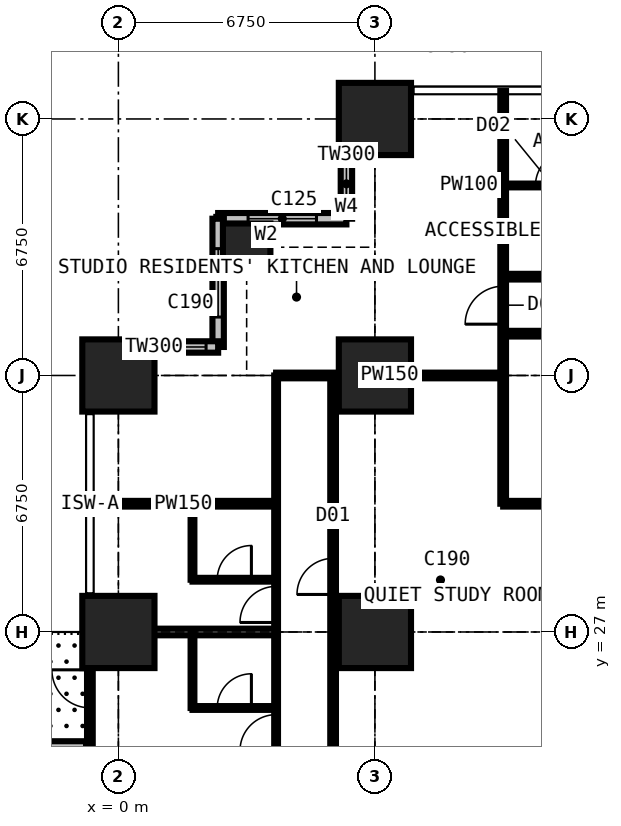
"""IFC4 building model, lengths in metres.
Left out: names, types, materials, properties, quantities, classifications, styles, units other than length and angle.
Written with IfcOpenShell. Run it as: python <this file> out.ifc"""

import sys

from ifc_helpers import new_model, si_unit, direction, frame, frame_2d, origin, origin_2d, place, context, subcontext, project, spatial, rectangle, extrude, element, fill, save


model = new_model("IFC4")
c1 = context("Model", 3, precision=1e-05, world=origin(), true_north=direction((0.0, 1.0)))
c2 = subcontext(c1, "Body", "Model", "MODEL_VIEW")
j1 = project(units=[si_unit("LENGTHUNIT", "METRE"), si_unit("PLANEANGLEUNIT", "RADIAN")], contexts=[c1])
p1 = place(None, origin())
s1 = spatial("IfcSite", under=j1, at=p1, CompositionType="ELEMENT")
p2 = place(p1, origin())
s2 = spatial("IfcBuilding", under=s1, at=p2, CompositionType="ELEMENT")
p3 = place(p2, frame((0.0, 0.0, 36.0)))
s3 = spatial("IfcBuildingStorey", under=s2, at=p3, CompositionType="ELEMENT", Elevation=36.0)
for number, where, z_axis, x_axis in (
    (1, (0.0, 27.0, 0.0), (0.0, 0.0, 1.0), (1.0, 0.0, 0.0)),
    (2, (0.0, 33.75, 0.0), (0.0, 0.0, 1.0), (1.0, 0.0, 0.0)),
):
    element("IfcColumn", number, at=place(p3, frame(where, z_axis=z_axis, x_axis=x_axis)), inside=s3, PredefinedType="COLUMN", context=c2, shape_type="SweptSolid", body=[
        extrude(rectangle(XDim=1.9, YDim=1.9, at=origin_2d()), origin(), (0.0, 0.0, 1.0), 3.6),
    ])
p4 = place(p3, frame((3.375, 37.125, 0.0), z_axis=(0.0, 0.0, 1.0), x_axis=(1.0, 0.0, 0.0)))
e3 = element("IfcColumn", 3, at=p4, inside=s3, PredefinedType="COLUMN", context=c2, shape_type="SweptSolid", body=[
    extrude(rectangle(XDim=1.25, YDim=1.25, at=origin_2d()), origin(), (0.0, 0.0, 1.0), 3.6),
])
for number, where, z_axis, x_axis in (
    (4, (6.75, 27.0, 0.0), (0.0, 0.0, 1.0), (1.0, 0.0, 0.0)),
    (5, (6.75, 33.75, 0.0), (0.0, 0.0, 1.0), (1.0, 0.0, 0.0)),
    (6, (6.75, 40.5, 0.0), (0.0, 0.0, 1.0), (1.0, 0.0, 0.0)),
):
    element("IfcColumn", number, at=place(p3, frame(where, z_axis=z_axis, x_axis=x_axis)), inside=s3, PredefinedType="COLUMN", context=c2, shape_type="SweptSolid", body=[
        extrude(rectangle(XDim=1.9, YDim=1.9, at=origin_2d()), origin(), (0.0, 0.0, 1.0), 3.6),
    ])
p5 = place(p3, frame((6.0, 41.25, 0.0), z_axis=(0.0, 0.0, 1.0), x_axis=(0.0, -1.0, 0.0)))
e7 = element("IfcWall", 7, at=p5, inside=s3, PredefinedType="SOLIDWALL", context=c2, shape_type="SweptSolid", body=[
    extrude(rectangle(XDim=3.375, YDim=0.3, at=frame_2d((1.688, 0.0))), origin(), (0.0, 0.0, 1.0), 3.375),
])
p6 = place(p5, frame((1.857, 0.0, 0.9)))
e8 = element("IfcOpeningElement", 8, at=p6, cuts=e7, PredefinedType="OPENING", context=c2, shape_type="SweptSolid", body=[
    extrude(rectangle(XDim=1.2, YDim=1.8, at=frame_2d((0.6, 0.9))), frame((0.0, 0.16, 0.0), z_axis=(0.0, -1.0, 0.0), x_axis=(1.0, 0.0, 0.0)), (0.0, 0.0, 1.0), 0.32),
])
p7 = place(p3, frame((6.0, 37.875, 0.0), z_axis=(0.0, 0.0, 1.0), x_axis=(-1.0, 0.0, 0.0)))
e9 = element("IfcWall", 9, at=p7, inside=s3, PredefinedType="SOLIDWALL", context=c2, shape_type="SweptSolid", body=[
    extrude(rectangle(XDim=3.375, YDim=0.3, at=frame_2d((1.688, 0.0))), origin(), (0.0, 0.0, 1.0), 3.375),
])
p8 = place(p7, frame((0.788, 0.0, 0.6)))
e10 = element("IfcOpeningElement", 10, at=p8, cuts=e9, PredefinedType="OPENING", context=c2, shape_type="SweptSolid", body=[
    extrude(rectangle(XDim=1.8, YDim=2.1, at=frame_2d((0.9, 1.05))), frame((0.0, 0.16, 0.0), z_axis=(0.0, -1.0, 0.0), x_axis=(1.0, 0.0, 0.0)), (0.0, 0.0, 1.0), 0.32),
])
p9 = place(p3, frame((2.625, 37.875, 0.0), z_axis=(0.0, 0.0, 1.0), x_axis=(0.0, -1.0, 0.0)))
e11 = element("IfcWall", 11, at=p9, inside=s3, PredefinedType="SOLIDWALL", context=c2, shape_type="SweptSolid", body=[
    extrude(rectangle(XDim=3.375, YDim=0.3, at=frame_2d((1.688, 0.0))), origin(), (0.0, 0.0, 1.0), 3.375),
])
p10 = place(p9, frame((0.788, 0.0, 0.6)))
e12 = element("IfcOpeningElement", 12, at=p10, cuts=e11, PredefinedType="OPENING", context=c2, shape_type="SweptSolid", body=[
    extrude(rectangle(XDim=1.8, YDim=2.1, at=frame_2d((0.9, 1.05))), frame((0.0, 0.16, 0.0), z_axis=(0.0, -1.0, 0.0), x_axis=(1.0, 0.0, 0.0)), (0.0, 0.0, 1.0), 0.32),
])
p11 = place(p3, frame((2.625, 34.5, 0.0), z_axis=(0.0, 0.0, 1.0), x_axis=(-1.0, 0.0, 0.0)))
e13 = element("IfcWall", 13, at=p11, inside=s3, PredefinedType="SOLIDWALL", context=c2, shape_type="SweptSolid", body=[
    extrude(rectangle(XDim=3.375, YDim=0.3, at=frame_2d((1.688, 0.0))), origin(), (0.0, 0.0, 1.0), 3.375),
])
p12 = place(p11, frame((0.317, 0.0, 0.9)))
e14 = element("IfcOpeningElement", 14, at=p12, cuts=e13, PredefinedType="OPENING", context=c2, shape_type="SweptSolid", body=[
    extrude(rectangle(XDim=1.2, YDim=1.8, at=frame_2d((0.6, 0.9))), frame((0.0, 0.16, 0.0), z_axis=(0.0, -1.0, 0.0), x_axis=(1.0, 0.0, 0.0)), (0.0, 0.0, 1.0), 0.32),
])
p13 = place(p3, frame((-0.75, 20.25, 0.0), z_axis=(0.0, 0.0, 1.0), x_axis=(0.0, 1.0, 0.0)))
e15 = element("IfcWall", 15, at=p13, inside=s3, PredefinedType="SOLIDWALL", context=c2, shape_type="SweptSolid", body=[
    extrude(rectangle(XDim=6.75, YDim=0.15, at=frame_2d((3.375, 0.0))), origin(), (0.0, 0.0, 1.0), 3.375),
])
p14 = place(p13, frame((0.996, 0.0, 0.0)))
e16 = element("IfcOpeningElement", 16, at=p14, cuts=e15, PredefinedType="OPENING", context=c2, shape_type="SweptSolid", body=[
    extrude(rectangle(XDim=1.0, YDim=2.2, at=frame_2d((0.5, 1.1))), frame((0.0, 0.085, 0.0), z_axis=(0.0, -1.0, 0.0), x_axis=(1.0, 0.0, 0.0)), (0.0, 0.0, 1.0), 0.17),
])
p15 = place(p13, frame((2.042, 0.0, 0.9)))
e17 = element("IfcOpeningElement", 17, at=p15, cuts=e15, PredefinedType="OPENING", context=c2, shape_type="SweptSolid", body=[
    extrude(rectangle(XDim=1.2, YDim=1.8, at=frame_2d((0.6, 0.9))), frame((0.0, 0.085, 0.0), z_axis=(0.0, -1.0, 0.0), x_axis=(1.0, 0.0, 0.0)), (0.0, 0.0, 1.0), 0.17),
])
p16 = place(p13, frame((4.754, 0.0, 0.0)))
e18 = element("IfcOpeningElement", 18, at=p16, cuts=e15, PredefinedType="OPENING", context=c2, shape_type="SweptSolid", body=[
    extrude(rectangle(XDim=1.0, YDim=2.2, at=frame_2d((0.5, 1.1))), frame((0.0, 0.085, 0.0), z_axis=(0.0, -1.0, 0.0), x_axis=(1.0, 0.0, 0.0)), (0.0, 0.0, 1.0), 0.17),
])
p17 = place(p13, frame((3.508, 0.0, 0.9)))
e19 = element("IfcOpeningElement", 19, at=p17, cuts=e15, PredefinedType="OPENING", context=c2, shape_type="SweptSolid", body=[
    extrude(rectangle(XDim=1.2, YDim=1.8, at=frame_2d((0.6, 0.9))), frame((0.0, 0.085, 0.0), z_axis=(0.0, -1.0, 0.0), x_axis=(1.0, 0.0, 0.0)), (0.0, 0.0, 1.0), 0.17),
])
p18 = place(p3, frame((-0.85, 23.625, 0.0), z_axis=(0.0, 0.0, 1.0), x_axis=(-1.0, 0.0, 0.0)))
e20 = element("IfcWall", 20, at=p18, inside=s3, PredefinedType="USERDEFINED", context=c2, shape_type="SweptSolid", body=[
    extrude(rectangle(XDim=2.2, YDim=1.0, at=frame_2d((1.1, 0.0))), origin(), (0.0, 0.0, 1.0), 0.9),
])
p19 = place(p3, frame((-0.734, 27.0, 0.0), z_axis=(0.0, 0.0, 1.0), x_axis=(1.0, 0.0, 0.0)))
e21 = element("IfcWall", 21, at=p19, inside=s3, PredefinedType="PARTITIONING", context=c2, shape_type="SweptSolid", body=[
    extrude(rectangle(XDim=4.884, YDim=0.175, at=frame_2d((2.442, 0.0))), origin(), (0.0, 0.0, 1.0), 2.877),
])
p20 = place(p3, frame((-0.734, 30.375, 0.0), z_axis=(0.0, 0.0, 1.0), x_axis=(1.0, 0.0, 0.0)))
e22 = element("IfcWall", 22, at=p20, inside=s3, PredefinedType="PARTITIONING", context=c2, shape_type="SweptSolid", body=[
    extrude(rectangle(XDim=4.884, YDim=0.15, at=frame_2d((2.442, 0.0))), origin(), (0.0, 0.0, 1.0), 3.375),
])
p21 = place(p3, frame((1.95, 25.0, 0.0), z_axis=(0.0, 0.0, 1.0), x_axis=(0.0, 1.0, 0.0)))
e23 = element("IfcWall", 23, at=p21, inside=s3, PredefinedType="PARTITIONING", context=c2, shape_type="SweptSolid", body=[
    extrude(rectangle(XDim=2.0, YDim=0.1, at=frame_2d((1.0, 0.0))), origin(), (0.0, 0.0, 1.0), 3.375),
])
p22 = place(p3, frame((1.95, 25.0, 0.0), z_axis=(0.0, 0.0, 1.0), x_axis=(1.0, 0.0, 0.0)))
e24 = element("IfcWall", 24, at=p22, inside=s3, PredefinedType="PARTITIONING", context=c2, shape_type="SweptSolid", body=[
    extrude(rectangle(XDim=2.2, YDim=0.1, at=frame_2d((1.1, 0.0))), origin(), (0.0, 0.0, 1.0), 3.375),
])
p23 = place(p22, frame((0.65, 0.0, 0.0)))
e25 = element("IfcOpeningElement", 25, at=p23, cuts=e24, PredefinedType="OPENING", context=c2, shape_type="SweptSolid", body=[
    extrude(rectangle(XDim=0.9, YDim=2.2, at=frame_2d((0.45, 1.1))), frame((0.0, 0.06, 0.0), z_axis=(0.0, -1.0, 0.0), x_axis=(1.0, 0.0, 0.0)), (0.0, 0.0, 1.0), 0.12),
])
p24 = place(p3, frame((1.95, 28.375, 0.0), z_axis=(0.0, 0.0, 1.0), x_axis=(0.0, 1.0, 0.0)))
e26 = element("IfcWall", 26, at=p24, inside=s3, PredefinedType="PARTITIONING", context=c2, shape_type="SweptSolid", body=[
    extrude(rectangle(XDim=2.0, YDim=0.1, at=frame_2d((1.0, 0.0))), origin(), (0.0, 0.0, 1.0), 3.375),
])
p25 = place(p3, frame((1.95, 28.375, 0.0), z_axis=(0.0, 0.0, 1.0), x_axis=(1.0, 0.0, 0.0)))
e27 = element("IfcWall", 27, at=p25, inside=s3, PredefinedType="PARTITIONING", context=c2, shape_type="SweptSolid", body=[
    extrude(rectangle(XDim=2.2, YDim=0.1, at=frame_2d((1.1, 0.0))), origin(), (0.0, 0.0, 1.0), 3.375),
])
p26 = place(p25, frame((0.65, 0.0, 0.0)))
e28 = element("IfcOpeningElement", 28, at=p26, cuts=e27, PredefinedType="OPENING", context=c2, shape_type="SweptSolid", body=[
    extrude(rectangle(XDim=0.9, YDim=2.2, at=frame_2d((0.45, 1.1))), frame((0.0, 0.06, 0.0), z_axis=(0.0, -1.0, 0.0), x_axis=(1.0, 0.0, 0.0)), (0.0, 0.0, 1.0), 0.12),
])
p27 = place(p3, frame((4.15, 10.125, 0.0), z_axis=(0.0, 0.0, 1.0), x_axis=(0.0, 1.0, 0.0)))
e29 = element("IfcWall", 29, at=p27, inside=s3, PredefinedType="PARTITIONING", context=c2, shape_type="SweptSolid", body=[
    extrude(rectangle(XDim=23.625, YDim=0.1, at=frame_2d((11.812, 0.0))), origin(), (0.0, 0.0, 1.0), 3.375),
])
p28 = place(p27, frame((0.2, 0.0, 0.0)))
e30 = element("IfcOpeningElement", 30, at=p28, cuts=e29, PredefinedType="OPENING", context=c2, shape_type="SweptSolid", body=[
    extrude(rectangle(XDim=0.95, YDim=2.2, at=frame_2d((0.475, 1.1))), frame((0.0, 0.06, 0.0), z_axis=(0.0, -1.0, 0.0), x_axis=(1.0, 0.0, 0.0)), (0.0, 0.0, 1.0), 0.12),
])
p29 = place(p27, frame((3.625, 0.0, 0.0)))
e31 = element("IfcOpeningElement", 31, at=p29, cuts=e29, PredefinedType="OPENING", context=c2, shape_type="SweptSolid", body=[
    extrude(rectangle(XDim=0.95, YDim=2.2, at=frame_2d((0.475, 1.1))), frame((0.0, 0.06, 0.0), z_axis=(0.0, -1.0, 0.0), x_axis=(1.0, 0.0, 0.0)), (0.0, 0.0, 1.0), 0.12),
])
p30 = place(p27, frame((7.0, 0.0, 0.0)))
e32 = element("IfcOpeningElement", 32, at=p30, cuts=e29, PredefinedType="OPENING", context=c2, shape_type="SweptSolid", body=[
    extrude(rectangle(XDim=0.95, YDim=2.2, at=frame_2d((0.475, 1.1))), frame((0.0, 0.06, 0.0), z_axis=(0.0, -1.0, 0.0), x_axis=(1.0, 0.0, 0.0)), (0.0, 0.0, 1.0), 0.12),
])
p31 = place(p27, frame((10.375, 0.0, 0.0)))
e33 = element("IfcOpeningElement", 33, at=p31, cuts=e29, PredefinedType="OPENING", context=c2, shape_type="SweptSolid", body=[
    extrude(rectangle(XDim=0.95, YDim=2.2, at=frame_2d((0.475, 1.1))), frame((0.0, 0.06, 0.0), z_axis=(0.0, -1.0, 0.0), x_axis=(1.0, 0.0, 0.0)), (0.0, 0.0, 1.0), 0.12),
])
p32 = place(p27, frame((13.75, 0.0, 0.0)))
e34 = element("IfcOpeningElement", 34, at=p32, cuts=e29, PredefinedType="OPENING", context=c2, shape_type="SweptSolid", body=[
    extrude(rectangle(XDim=0.95, YDim=2.2, at=frame_2d((0.475, 1.1))), frame((0.0, 0.06, 0.0), z_axis=(0.0, -1.0, 0.0), x_axis=(1.0, 0.0, 0.0)), (0.0, 0.0, 1.0), 0.12),
])
p33 = place(p27, frame((17.125, 0.0, 0.0)))
e35 = element("IfcOpeningElement", 35, at=p33, cuts=e29, PredefinedType="OPENING", context=c2, shape_type="SweptSolid", body=[
    extrude(rectangle(XDim=0.95, YDim=2.2, at=frame_2d((0.475, 1.1))), frame((0.0, 0.06, 0.0), z_axis=(0.0, -1.0, 0.0), x_axis=(1.0, 0.0, 0.0)), (0.0, 0.0, 1.0), 0.12),
])
p34 = place(p3, frame((4.15, 33.75, 0.0), z_axis=(0.0, 0.0, 1.0), x_axis=(1.0, 0.0, 0.0)))
e36 = element("IfcWall", 36, at=p34, inside=s3, PredefinedType="PARTITIONING", context=c2, shape_type="SweptSolid", body=[
    extrude(rectangle(XDim=5.975, YDim=0.15, at=frame_2d((2.988, 0.0))), origin(), (0.0, 0.0, 1.0), 2.877),
])
p35 = place(p3, frame((5.65, 22.988, 0.0), z_axis=(0.0, 0.0, 1.0), x_axis=(0.0, 1.0, 0.0)))
e37 = element("IfcWall", 37, at=p35, inside=s3, PredefinedType="PARTITIONING", context=c2, shape_type="SweptSolid", body=[
    extrude(rectangle(XDim=10.762, YDim=0.15, at=frame_2d((5.381, 0.0))), origin(), (0.0, 0.0, 1.0), 3.375),
])
p36 = place(p35, frame((5.0, 0.0, 0.0)))
e38 = element("IfcOpeningElement", 38, at=p36, cuts=e37, PredefinedType="OPENING", context=c2, shape_type="SweptSolid", body=[
    extrude(rectangle(XDim=0.95, YDim=2.2, at=frame_2d((0.475, 1.1))), frame((0.0, 0.085, 0.0), z_axis=(0.0, -1.0, 0.0), x_axis=(1.0, 0.0, 0.0)), (0.0, 0.0, 1.0), 0.17),
])
p37 = place(p3, frame((10.125, 30.375, 0.0), z_axis=(0.0, 0.0, 1.0), x_axis=(0.0, 1.0, 0.0)))
e39 = element("IfcWall", 39, at=p37, inside=s3, PredefinedType="PARTITIONING", context=c2, shape_type="SweptSolid", body=[
    extrude(rectangle(XDim=10.859, YDim=0.15, at=frame_2d((5.429, 0.0))), origin(), (0.0, 0.0, 1.0), 3.375),
])
p38 = place(p37, frame((4.725, 0.0, 0.0)))
e40 = element("IfcOpeningElement", 40, at=p38, cuts=e39, PredefinedType="OPENING", context=c2, shape_type="SweptSolid", body=[
    extrude(rectangle(XDim=1.0, YDim=2.2, at=frame_2d((0.5, 1.1))), frame((0.0, 0.085, 0.0), z_axis=(0.0, -1.0, 0.0), x_axis=(1.0, 0.0, 0.0)), (0.0, 0.0, 1.0), 0.17),
])
p39 = place(p3, frame((10.125, 30.375, 0.0), z_axis=(0.0, 0.0, 1.0), x_axis=(1.0, 0.0, 0.0)))
e41 = element("IfcWall", 41, at=p39, inside=s3, PredefinedType="PARTITIONING", context=c2, shape_type="SweptSolid", body=[
    extrude(rectangle(XDim=1.175, YDim=0.15, at=frame_2d((0.587, 0.0))), origin(), (0.0, 0.0, 1.0), 3.375),
])
p40 = place(p3, frame((10.125, 34.85, 0.0), z_axis=(0.0, 0.0, 1.0), x_axis=(1.0, 0.0, 0.0)))
e42 = element("IfcWall", 42, at=p40, inside=s3, PredefinedType="PARTITIONING", context=c2, shape_type="SweptSolid", body=[
    extrude(rectangle(XDim=10.762, YDim=0.15, at=frame_2d((5.381, 0.0))), origin(), (0.0, 0.0, 1.0), 3.375),
])
p41 = place(p40, frame((4.9, 0.0, 0.0)))
e43 = element("IfcOpeningElement", 43, at=p41, cuts=e42, PredefinedType="OPENING", context=c2, shape_type="SweptSolid", body=[
    extrude(rectangle(XDim=0.95, YDim=2.2, at=frame_2d((0.475, 1.1))), frame((0.0, 0.085, 0.0), z_axis=(0.0, -1.0, 0.0), x_axis=(1.0, 0.0, 0.0)), (0.0, 0.0, 1.0), 0.17),
])
p42 = place(p3, frame((10.125, 36.35, 0.0), z_axis=(0.0, 0.0, 1.0), x_axis=(1.0, 0.0, 0.0)))
e44 = element("IfcWall", 44, at=p42, inside=s3, PredefinedType="PARTITIONING", context=c2, shape_type="SweptSolid", body=[
    extrude(rectangle(XDim=23.625, YDim=0.15, at=frame_2d((11.812, 0.0))), origin(), (0.0, 0.0, 1.0), 3.375),
])
p43 = place(p42, frame((20.5, 0.0, 0.0)))
e45 = element("IfcOpeningElement", 45, at=p43, cuts=e44, PredefinedType="OPENING", context=c2, shape_type="SweptSolid", body=[
    extrude(rectangle(XDim=0.95, YDim=2.2, at=frame_2d((0.475, 1.1))), frame((0.0, 0.085, 0.0), z_axis=(0.0, -1.0, 0.0), x_axis=(1.0, 0.0, 0.0)), (0.0, 0.0, 1.0), 0.17),
])
p44 = place(p42, frame((17.125, 0.0, 0.0)))
e46 = element("IfcOpeningElement", 46, at=p44, cuts=e44, PredefinedType="OPENING", context=c2, shape_type="SweptSolid", body=[
    extrude(rectangle(XDim=0.95, YDim=2.2, at=frame_2d((0.475, 1.1))), frame((0.0, 0.085, 0.0), z_axis=(0.0, -1.0, 0.0), x_axis=(1.0, 0.0, 0.0)), (0.0, 0.0, 1.0), 0.17),
])
p45 = place(p42, frame((13.7, 0.0, 0.0)))
e47 = element("IfcOpeningElement", 47, at=p45, cuts=e44, PredefinedType="OPENING", context=c2, shape_type="SweptSolid", body=[
    extrude(rectangle(XDim=0.95, YDim=2.2, at=frame_2d((0.475, 1.1))), frame((0.0, 0.085, 0.0), z_axis=(0.0, -1.0, 0.0), x_axis=(1.0, 0.0, 0.0)), (0.0, 0.0, 1.0), 0.17),
])
p46 = place(p42, frame((4.2, 0.0, 0.0)))
e48 = element("IfcOpeningElement", 48, at=p46, cuts=e44, PredefinedType="OPENING", context=c2, shape_type="SweptSolid", body=[
    extrude(rectangle(XDim=0.95, YDim=2.2, at=frame_2d((0.475, 1.1))), frame((0.0, 0.085, 0.0), z_axis=(0.0, -1.0, 0.0), x_axis=(1.0, 0.0, 0.0)), (0.0, 0.0, 1.0), 0.17),
])
p47 = place(p42, frame((10.95, 0.0, 0.0)))
e49 = element("IfcOpeningElement", 49, at=p47, cuts=e44, PredefinedType="OPENING", context=c2, shape_type="SweptSolid", body=[
    extrude(rectangle(XDim=0.95, YDim=2.2, at=frame_2d((0.475, 1.1))), frame((0.0, 0.085, 0.0), z_axis=(0.0, -1.0, 0.0), x_axis=(1.0, 0.0, 0.0)), (0.0, 0.0, 1.0), 0.17),
])
p48 = place(p3, frame((10.125, 38.75, 0.0), z_axis=(0.0, 0.0, 1.0), x_axis=(1.0, 0.0, 0.0)))
e50 = element("IfcWall", 50, at=p48, inside=s3, PredefinedType="PARTITIONING", context=c2, shape_type="SweptSolid", body=[
    extrude(rectangle(XDim=2.6, YDim=0.1, at=frame_2d((1.3, 0.0))), origin(), (0.0, 0.0, 1.0), 3.375),
])
p49 = place(p48, frame((0.85, 0.0, 0.0)))
e51 = element("IfcOpeningElement", 51, at=p49, cuts=e50, PredefinedType="OPENING", context=c2, shape_type="SweptSolid", body=[
    extrude(rectangle(XDim=0.9, YDim=2.2, at=frame_2d((0.45, 1.1))), frame((0.0, 0.06, 0.0), z_axis=(0.0, -1.0, 0.0), x_axis=(1.0, 0.0, 0.0)), (0.0, 0.0, 1.0), 0.12),
])
p50 = place(p6, origin())
e52 = element("IfcWindow", 52, at=p50, inside=s3, PartitioningType="SINGLE_PANEL", PredefinedType="WINDOW", context=c2, shape_type="SweptSolid", body=[
    extrude(rectangle(XDim=1.2, YDim=1.8, at=frame_2d((0.6, 0.9))), frame((0.0, 0.03, 0.0), z_axis=(0.0, -1.0, 0.0), x_axis=(1.0, 0.0, 0.0)), (0.0, 0.0, 1.0), 0.06),
])
fill(e8, e52)
p51 = place(p8, origin())
e53 = element("IfcWindow", 53, at=p51, inside=s3, PartitioningType="SINGLE_PANEL", PredefinedType="WINDOW", context=c2, shape_type="SweptSolid", body=[
    extrude(rectangle(XDim=1.8, YDim=2.1, at=frame_2d((0.9, 1.05))), frame((0.0, 0.03, 0.0), z_axis=(0.0, -1.0, 0.0), x_axis=(1.0, 0.0, 0.0)), (0.0, 0.0, 1.0), 0.06),
])
fill(e10, e53)
p52 = place(p10, origin())
e54 = element("IfcWindow", 54, at=p52, inside=s3, PartitioningType="SINGLE_PANEL", PredefinedType="WINDOW", context=c2, shape_type="SweptSolid", body=[
    extrude(rectangle(XDim=1.8, YDim=2.1, at=frame_2d((0.9, 1.05))), frame((0.0, 0.03, 0.0), z_axis=(0.0, -1.0, 0.0), x_axis=(1.0, 0.0, 0.0)), (0.0, 0.0, 1.0), 0.06),
])
fill(e12, e54)
p53 = place(p12, origin())
e55 = element("IfcWindow", 55, at=p53, inside=s3, PartitioningType="SINGLE_PANEL", PredefinedType="WINDOW", context=c2, shape_type="SweptSolid", body=[
    extrude(rectangle(XDim=1.2, YDim=1.8, at=frame_2d((0.6, 0.9))), frame((0.0, 0.03, 0.0), z_axis=(0.0, -1.0, 0.0), x_axis=(1.0, 0.0, 0.0)), (0.0, 0.0, 1.0), 0.06),
])
fill(e14, e55)
p54 = place(p16, origin())
e56 = element("IfcDoor", 56, at=p54, inside=s3, OperationType="SINGLE_SWING_RIGHT", PredefinedType="DOOR", context=c2, shape_type="SweptSolid", body=[
    extrude(rectangle(XDim=1.0, YDim=2.2, at=frame_2d((0.5, 1.1))), frame((0.0, 0.025, 0.0), z_axis=(0.0, -1.0, 0.0), x_axis=(1.0, 0.0, 0.0)), (0.0, 0.0, 1.0), 0.05),
])
fill(e18, e56)
p55 = place(p17, origin())
e57 = element("IfcWindow", 57, at=p55, inside=s3, PartitioningType="SINGLE_PANEL", PredefinedType="WINDOW", context=c2, shape_type="SweptSolid", body=[
    extrude(rectangle(XDim=1.2, YDim=1.8, at=frame_2d((0.6, 0.9))), frame((0.0, 0.03, 0.0), z_axis=(0.0, -1.0, 0.0), x_axis=(1.0, 0.0, 0.0)), (0.0, 0.0, 1.0), 0.06),
])
fill(e19, e57)
p56 = place(p49, origin())
e58 = element("IfcDoor", 58, at=p56, inside=s3, OperationType="SINGLE_SWING_RIGHT", PredefinedType="DOOR", context=c2, shape_type="SweptSolid", body=[
    extrude(rectangle(XDim=0.9, YDim=2.2, at=frame_2d((0.45, 1.1))), frame((0.0, 0.025, 0.0), z_axis=(0.0, -1.0, 0.0), x_axis=(1.0, 0.0, 0.0)), (0.0, 0.0, 1.0), 0.05),
])
fill(e51, e58)
p57 = place(p38, origin())
e59 = element("IfcDoor", 59, at=p57, inside=s3, OperationType="SINGLE_SWING_LEFT", PredefinedType="DOOR", context=c2, shape_type="SweptSolid", body=[
    extrude(rectangle(XDim=1.0, YDim=2.2, at=frame_2d((0.5, 1.1))), frame((0.0, 0.025, 0.0), z_axis=(0.0, -1.0, 0.0), x_axis=(1.0, 0.0, 0.0)), (0.0, 0.0, 1.0), 0.05),
])
fill(e40, e59)
p58 = place(p32, origin())
e60 = element("IfcDoor", 60, at=p58, inside=s3, OperationType="SINGLE_SWING_LEFT", PredefinedType="DOOR", context=c2, shape_type="SweptSolid", body=[
    extrude(rectangle(XDim=0.95, YDim=2.2, at=frame_2d((0.475, 1.1))), frame((0.0, 0.025, 0.0), z_axis=(0.0, -1.0, 0.0), x_axis=(1.0, 0.0, 0.0)), (0.0, 0.0, 1.0), 0.05),
])
fill(e34, e60)
p59 = place(p23, origin())
e61 = element("IfcDoor", 61, at=p59, inside=s3, OperationType="SINGLE_SWING_RIGHT", PredefinedType="DOOR", context=c2, shape_type="SweptSolid", body=[
    extrude(rectangle(XDim=0.9, YDim=2.2, at=frame_2d((0.45, 1.1))), frame((0.0, 0.025, 0.0), z_axis=(0.0, -1.0, 0.0), x_axis=(1.0, 0.0, 0.0)), (0.0, 0.0, 1.0), 0.05),
])
fill(e25, e61)
p60 = place(p33, origin())
e62 = element("IfcDoor", 62, at=p60, inside=s3, OperationType="SINGLE_SWING_LEFT", PredefinedType="DOOR", context=c2, shape_type="SweptSolid", body=[
    extrude(rectangle(XDim=0.95, YDim=2.2, at=frame_2d((0.475, 1.1))), frame((0.0, 0.025, 0.0), z_axis=(0.0, -1.0, 0.0), x_axis=(1.0, 0.0, 0.0)), (0.0, 0.0, 1.0), 0.05),
])
fill(e35, e62)
p61 = place(p26, origin())
e63 = element("IfcDoor", 63, at=p61, inside=s3, OperationType="SINGLE_SWING_RIGHT", PredefinedType="DOOR", context=c2, shape_type="SweptSolid", body=[
    extrude(rectangle(XDim=0.9, YDim=2.2, at=frame_2d((0.45, 1.1))), frame((0.0, 0.025, 0.0), z_axis=(0.0, -1.0, 0.0), x_axis=(1.0, 0.0, 0.0)), (0.0, 0.0, 1.0), 0.05),
])
fill(e28, e63)
p62 = place(p36, origin())
e64 = element("IfcDoor", 64, at=p62, inside=s3, OperationType="SINGLE_SWING_LEFT", PredefinedType="DOOR", context=c2, shape_type="SweptSolid", body=[
    extrude(rectangle(XDim=0.95, YDim=2.2, at=frame_2d((0.475, 1.1))), frame((0.0, 0.025, 0.0), z_axis=(0.0, -1.0, 0.0), x_axis=(1.0, 0.0, 0.0)), (0.0, 0.0, 1.0), 0.05),
])
fill(e38, e64)
save(model, sys.argv[1])
